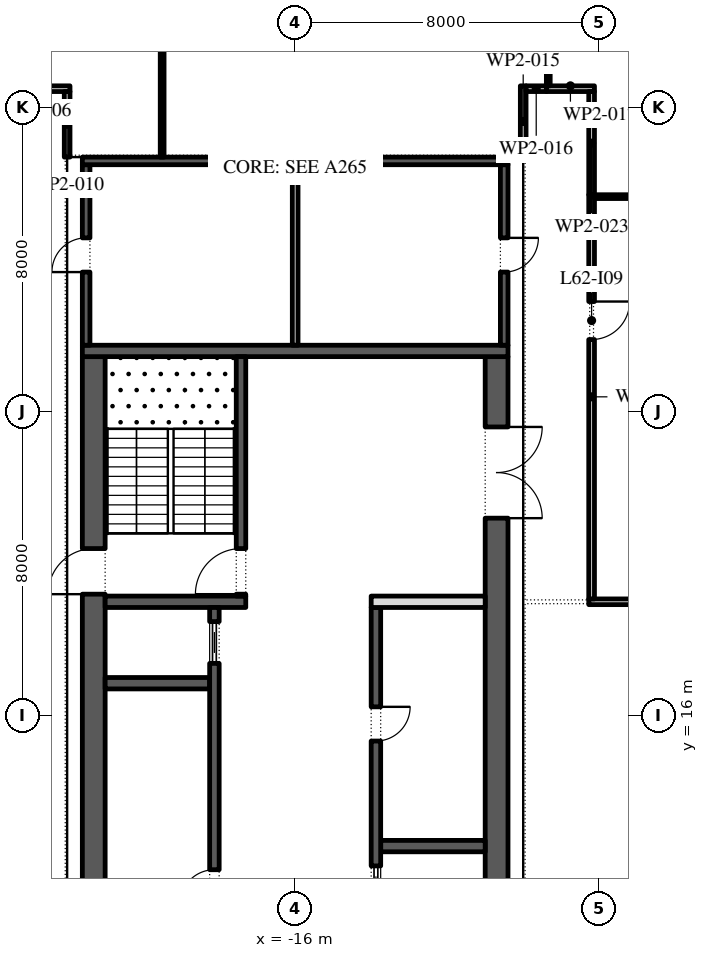
"""IFC4 building model, lengths in metres.
Left out: names, types, materials, properties, quantities, classifications, styles, units other than length and angle.
Written with IfcOpenShell. Run it as: python <this file> out.ifc"""

import sys

from ifc_helpers import new_model, si_unit, direction, frame, frame_2d, origin, place, context, subcontext, project, spatial, rectangle, extrude, element, fill, save


model = new_model("IFC4")
c1 = context("Model", 3, precision=1e-05, world=origin(), true_north=direction((0.0, 1.0)))
c2 = subcontext(c1, "Body", "Model", "MODEL_VIEW")
j1 = project(units=[si_unit("LENGTHUNIT", "METRE"), si_unit("PLANEANGLEUNIT", "RADIAN")], contexts=[c1])
p1 = place(None, origin())
s1 = spatial("IfcSite", under=j1, at=p1, CompositionType="ELEMENT")
p2 = place(p1, origin())
s2 = spatial("IfcBuilding", under=s1, at=p2, CompositionType="ELEMENT")
p3 = place(p2, frame((0.0, 0.0, 285.0)))
s3 = spatial("IfcBuildingStorey", under=s2, at=p3, CompositionType="ELEMENT", Elevation=285.0)
p4 = place(p3, frame((-21.359, 48.678, 0.0), z_axis=(0.0, 0.0, 1.0), x_axis=(-0.224949198343, -0.974370493275, 0.0)))
e1 = element("IfcWall", 1, at=p4, inside=s3, PredefinedType="STANDARD", context=c2, shape_type="SweptSolid", body=[
    extrude(rectangle(XDim=49.5, YDim=0.3, at=frame_2d((24.75, 0.0))), origin(), (0.0, 0.0, 1.0), 4.0),
])
p5 = place(p4, frame((1.157, 0.0, 0.45)))
e2 = element("IfcOpeningElement", 2, at=p5, cuts=e1, PredefinedType="OPENING", context=c2, shape_type="SweptSolid", body=[
    extrude(rectangle(XDim=4.5, YDim=3.05, at=frame_2d((2.25, 1.525))), frame((0.0, 0.16, 0.0), z_axis=(0.0, -1.0, 0.0), x_axis=(1.0, 0.0, 0.0)), (0.0, 0.0, 1.0), 0.32),
])
p6 = place(p4, frame((9.171, 0.0, 0.0)))
e3 = element("IfcOpeningElement", 3, at=p6, cuts=e1, PredefinedType="OPENING", context=c2, shape_type="SweptSolid", body=[
    extrude(rectangle(XDim=2.4, YDim=3.5, at=frame_2d((1.2, 1.75))), frame((0.0, 0.16, 0.0), z_axis=(0.0, -1.0, 0.0), x_axis=(1.0, 0.0, 0.0)), (0.0, 0.0, 1.0), 0.32),
])
p7 = place(p4, frame((15.236, 0.0, 0.45)))
e4 = element("IfcOpeningElement", 4, at=p7, cuts=e1, PredefinedType="OPENING", context=c2, shape_type="SweptSolid", body=[
    extrude(rectangle(XDim=4.5, YDim=3.05, at=frame_2d((2.25, 1.525))), frame((0.0, 0.16, 0.0), z_axis=(0.0, -1.0, 0.0), x_axis=(1.0, 0.0, 0.0)), (0.0, 0.0, 1.0), 0.32),
])
p8 = place(p4, frame((22.35, 0.0, 0.45)))
e5 = element("IfcOpeningElement", 5, at=p8, cuts=e1, PredefinedType="OPENING", context=c2, shape_type="SweptSolid", body=[
    extrude(rectangle(XDim=4.5, YDim=3.05, at=frame_2d((2.25, 1.525))), frame((0.0, 0.16, 0.0), z_axis=(0.0, -1.0, 0.0), x_axis=(1.0, 0.0, 0.0)), (0.0, 0.0, 1.0), 0.32),
])
p9 = place(p4, frame((29.464, 0.0, 0.45)))
e6 = element("IfcOpeningElement", 6, at=p9, cuts=e1, PredefinedType="OPENING", context=c2, shape_type="SweptSolid", body=[
    extrude(rectangle(XDim=4.5, YDim=3.05, at=frame_2d((2.25, 1.525))), frame((0.0, 0.16, 0.0), z_axis=(0.0, -1.0, 0.0), x_axis=(1.0, 0.0, 0.0)), (0.0, 0.0, 1.0), 0.32),
])
p10 = place(p4, frame((37.628, 0.0, 0.0)))
e7 = element("IfcOpeningElement", 7, at=p10, cuts=e1, PredefinedType="OPENING", context=c2, shape_type="SweptSolid", body=[
    extrude(rectangle(XDim=2.4, YDim=3.325, at=frame_2d((1.2, 1.663))), frame((0.0, 0.16, 0.0), z_axis=(0.0, -1.0, 0.0), x_axis=(1.0, 0.0, 0.0)), (0.0, 0.0, 1.0), 0.32),
])
p11 = place(p4, frame((43.693, 0.0, 0.45)))
e8 = element("IfcOpeningElement", 8, at=p11, cuts=e1, PredefinedType="OPENING", context=c2, shape_type="SweptSolid", body=[
    extrude(rectangle(XDim=4.5, YDim=2.825, at=frame_2d((2.25, 1.413))), frame((0.0, 0.16, 0.0), z_axis=(0.0, -1.0, 0.0), x_axis=(1.0, 0.0, 0.0)), (0.0, 0.0, 1.0), 0.32),
])
p12 = place(p3, frame((-21.3, -2.45, 0.0), z_axis=(0.0, 0.0, 1.0), x_axis=(0.0, 1.0, 0.0)))
e9 = element("IfcWall", 9, at=p12, inside=s3, PredefinedType="SHEAR", context=c2, shape_type="SweptSolid", body=[
    extrude(rectangle(XDim=27.9, YDim=0.6, at=frame_2d((13.95, 0.0))), origin(), (0.0, 0.0, 1.0), 4.0),
])
p13 = place(p12, frame((5.05, 0.0, 0.0)))
e10 = element("IfcOpeningElement", 10, at=p13, cuts=e9, PredefinedType="OPENING", context=c2, shape_type="SweptSolid", body=[
    extrude(rectangle(XDim=1.2, YDim=2.1, at=frame_2d((0.6, 1.05))), frame((0.0, 0.31, 0.0), z_axis=(0.0, -1.0, 0.0), x_axis=(1.0, 0.0, 0.0)), (0.0, 0.0, 1.0), 0.62),
])
p14 = place(p12, frame((21.65, 0.0, 0.0)))
e11 = element("IfcOpeningElement", 11, at=p14, cuts=e9, PredefinedType="OPENING", context=c2, shape_type="SweptSolid", body=[
    extrude(rectangle(XDim=1.2, YDim=2.1, at=frame_2d((0.6, 1.05))), frame((0.0, 0.31, 0.0), z_axis=(0.0, -1.0, 0.0), x_axis=(1.0, 0.0, 0.0)), (0.0, 0.0, 1.0), 0.62),
])
p15 = place(p3, frame((-10.7, -2.45, 0.0), z_axis=(0.0, 0.0, 1.0), x_axis=(0.0, 1.0, 0.0)))
e12 = element("IfcWall", 12, at=p15, inside=s3, PredefinedType="SHEAR", context=c2, shape_type="SweptSolid", body=[
    extrude(rectangle(XDim=27.9, YDim=0.6, at=frame_2d((13.95, 0.0))), origin(), (0.0, 0.0, 1.0), 4.0),
])
p16 = place(p15, frame((23.65, 0.0, 0.0)))
e13 = element("IfcOpeningElement", 13, at=p16, cuts=e12, PredefinedType="OPENING", context=c2, shape_type="SweptSolid", body=[
    extrude(rectangle(XDim=2.4, YDim=2.1, at=frame_2d((1.2, 1.05))), frame((0.0, 0.31, 0.0), z_axis=(0.0, -1.0, 0.0), x_axis=(1.0, 0.0, 0.0)), (0.0, 0.0, 1.0), 0.62),
])
p17 = place(p15, frame((1.087, 0.0, 0.0)))
e14 = element("IfcOpeningElement", 14, at=p17, cuts=e12, PredefinedType="OPENING", context=c2, shape_type="SweptSolid", body=[
    extrude(rectangle(XDim=0.9, YDim=2.1, at=frame_2d((0.45, 1.05))), frame((0.0, 0.31, 0.0), z_axis=(0.0, -1.0, 0.0), x_axis=(1.0, 0.0, 0.0)), (0.0, 0.0, 1.0), 0.62),
])
p18 = place(p15, frame((4.262, 0.0, 0.0)))
e15 = element("IfcOpeningElement", 15, at=p18, cuts=e12, PredefinedType="OPENING", context=c2, shape_type="SweptSolid", body=[
    extrude(rectangle(XDim=1.0, YDim=2.1, at=frame_2d((0.5, 1.05))), frame((0.0, 0.31, 0.0), z_axis=(0.0, -1.0, 0.0), x_axis=(1.0, 0.0, 0.0)), (0.0, 0.0, 1.0), 0.62),
])
p19 = place(p3, frame((-21.6, 25.6, 0.0), z_axis=(0.0, 0.0, 1.0), x_axis=(1.0, 0.0, 0.0)))
e16 = element("IfcWall", 16, at=p19, inside=s3, PredefinedType="SHEAR", context=c2, shape_type="SweptSolid", body=[
    extrude(rectangle(XDim=11.2, YDim=0.3, at=frame_2d((5.6, 0.0))), origin(), (0.0, 0.0, 1.0), 4.0),
])
p20 = place(p3, frame((-21.0, 19.0, 0.0), z_axis=(0.0, 0.0, 1.0), x_axis=(1.0, 0.0, 0.0)))
e17 = element("IfcWall", 17, at=p20, inside=s3, PredefinedType="SHEAR", context=c2, shape_type="SweptSolid", body=[
    extrude(rectangle(XDim=3.7, YDim=0.3, at=frame_2d((1.85, 0.0))), origin(), (0.0, 0.0, 1.0), 4.0),
])
p21 = place(p3, frame((-17.425, 19.15, 0.0), z_axis=(0.0, 0.0, 1.0), x_axis=(0.0, 1.0, 0.0)))
e18 = element("IfcWall", 18, at=p21, inside=s3, PredefinedType="SHEAR", context=c2, shape_type="SweptSolid", body=[
    extrude(rectangle(XDim=6.3, YDim=0.25, at=frame_2d((3.15, 0.0))), origin(), (0.0, 0.0, 1.0), 4.0),
])
p22 = place(p21, frame((0.05, 0.0, 0.0)))
e19 = element("IfcOpeningElement", 19, at=p22, cuts=e18, PredefinedType="OPENING", context=c2, shape_type="SweptSolid", body=[
    extrude(rectangle(XDim=1.2, YDim=2.1, at=frame_2d((0.6, 1.05))), frame((0.0, 0.135, 0.0), z_axis=(0.0, -1.0, 0.0), x_axis=(1.0, 0.0, 0.0)), (0.0, 0.0, 1.0), 0.27),
])
p23 = place(p3, frame((-21.0, 16.857, 0.0), z_axis=(0.0, 0.0, 1.0), x_axis=(1.0, 0.0, 0.0)))
e20 = element("IfcWall", 20, at=p23, inside=s3, PredefinedType="SHEAR", context=c2, shape_type="SweptSolid", body=[
    extrude(rectangle(XDim=2.75, YDim=0.3, at=frame_2d((1.375, 0.0))), origin(), (0.0, 0.0, 1.0), 4.0),
])
p24 = place(p3, frame((-18.125, 4.15, 0.0), z_axis=(0.0, 0.0, 1.0), x_axis=(0.0, 1.0, 0.0)))
e21 = element("IfcWall", 21, at=p24, inside=s3, PredefinedType="SHEAR", context=c2, shape_type="SweptSolid", body=[
    extrude(rectangle(XDim=14.7, YDim=0.25, at=frame_2d((7.35, 0.0))), origin(), (0.0, 0.0, 1.0), 4.0),
])
p25 = place(p24, frame((6.9, 0.0, 0.0)))
e22 = element("IfcOpeningElement", 22, at=p25, cuts=e21, PredefinedType="OPENING", context=c2, shape_type="SweptSolid", body=[
    extrude(rectangle(XDim=0.9, YDim=2.1, at=frame_2d((0.45, 1.05))), frame((0.0, 0.135, 0.0), z_axis=(0.0, -1.0, 0.0), x_axis=(1.0, 0.0, 0.0)), (0.0, 0.0, 1.0), 0.27),
])
p26 = place(p24, frame((0.371, 0.0, 0.0)))
e23 = element("IfcOpeningElement", 23, at=p26, cuts=e21, PredefinedType="OPENING", context=c2, shape_type="SweptSolid", body=[
    extrude(rectangle(XDim=1.1, YDim=2.1, at=frame_2d((0.55, 1.05))), frame((0.0, 0.135, 0.0), z_axis=(0.0, -1.0, 0.0), x_axis=(1.0, 0.0, 0.0)), (0.0, 0.0, 1.0), 0.27),
])
p27 = place(p24, frame((13.229, 0.0, 0.0)))
e24 = element("IfcOpeningElement", 24, at=p27, cuts=e21, PredefinedType="OPENING", context=c2, shape_type="SweptSolid", body=[
    extrude(rectangle(XDim=1.1, YDim=2.1, at=frame_2d((0.55, 1.05))), frame((0.0, 0.135, 0.0), z_axis=(0.0, -1.0, 0.0), x_axis=(1.0, 0.0, 0.0)), (0.0, 0.0, 1.0), 0.27),
])
p28 = place(p3, frame((-13.75, 12.571, 0.0), z_axis=(0.0, 0.0, 1.0), x_axis=(1.0, 0.0, 0.0)))
e25 = element("IfcWall", 25, at=p28, inside=s3, PredefinedType="SHEAR", context=c2, shape_type="SweptSolid", body=[
    extrude(rectangle(XDim=2.75, YDim=0.3, at=frame_2d((1.375, 0.0))), origin(), (0.0, 0.0, 1.0), 4.0),
])
p29 = place(p3, frame((-13.875, -2.45, 0.0), z_axis=(0.0, 0.0, 1.0), x_axis=(0.0, 1.0, 0.0)))
e26 = element("IfcWall", 26, at=p29, inside=s3, PredefinedType="SHEAR", context=c2, shape_type="SweptSolid", body=[
    extrude(rectangle(XDim=21.3, YDim=0.25, at=frame_2d((10.65, 0.0))), origin(), (0.0, 0.0, 1.0), 4.0),
])
p30 = place(p29, frame((17.786, 0.0, 0.0)))
e27 = element("IfcOpeningElement", 27, at=p30, cuts=e26, PredefinedType="OPENING", context=c2, shape_type="SweptSolid", body=[
    extrude(rectangle(XDim=0.9, YDim=2.1, at=frame_2d((0.45, 1.05))), frame((0.0, 0.135, 0.0), z_axis=(0.0, -1.0, 0.0), x_axis=(1.0, 0.0, 0.0)), (0.0, 0.0, 1.0), 0.27),
])
p31 = place(p29, frame((6.971, 0.0, 0.0)))
e28 = element("IfcOpeningElement", 28, at=p31, cuts=e26, PredefinedType="OPENING", context=c2, shape_type="SweptSolid", body=[
    extrude(rectangle(XDim=1.1, YDim=2.1, at=frame_2d((0.55, 1.05))), frame((0.0, 0.135, 0.0), z_axis=(0.0, -1.0, 0.0), x_axis=(1.0, 0.0, 0.0)), (0.0, 0.0, 1.0), 0.27),
])
p32 = place(p29, frame((9.114, 0.0, 0.0)))
e29 = element("IfcOpeningElement", 29, at=p32, cuts=e26, PredefinedType="OPENING", context=c2, shape_type="SweptSolid", body=[
    extrude(rectangle(XDim=1.1, YDim=2.1, at=frame_2d((0.55, 1.05))), frame((0.0, 0.135, 0.0), z_axis=(0.0, -1.0, 0.0), x_axis=(1.0, 0.0, 0.0)), (0.0, 0.0, 1.0), 0.27),
])
p33 = place(p29, frame((11.257, 0.0, 0.0)))
e30 = element("IfcOpeningElement", 30, at=p33, cuts=e26, PredefinedType="OPENING", context=c2, shape_type="SweptSolid", body=[
    extrude(rectangle(XDim=1.1, YDim=2.1, at=frame_2d((0.55, 1.05))), frame((0.0, 0.135, 0.0), z_axis=(0.0, -1.0, 0.0), x_axis=(1.0, 0.0, 0.0)), (0.0, 0.0, 1.0), 0.27),
])
p34 = place(p29, frame((13.4, 0.0, 0.0)))
e31 = element("IfcOpeningElement", 31, at=p34, cuts=e26, PredefinedType="OPENING", context=c2, shape_type="SweptSolid", body=[
    extrude(rectangle(XDim=1.1, YDim=2.1, at=frame_2d((0.55, 1.05))), frame((0.0, 0.135, 0.0), z_axis=(0.0, -1.0, 0.0), x_axis=(1.0, 0.0, 0.0)), (0.0, 0.0, 1.0), 0.27),
])
p35 = place(p3, frame((-14.0, 19.0, 0.0), z_axis=(0.0, 0.0, 1.0), x_axis=(1.0, 0.0, 0.0)))
e32 = element("IfcWall", 32, at=p35, inside=s3, PredefinedType="PARTITIONING", context=c2, shape_type="SweptSolid", body=[
    extrude(rectangle(XDim=3.0, YDim=0.3, at=frame_2d((1.5, 0.0))), origin(), (0.0, 0.0, 1.0), 4.0),
])
p36 = place(p3, frame((-21.5, 25.75, 0.0), z_axis=(0.0, 0.0, 1.0), x_axis=(0.0, 1.0, 0.0)))
e33 = element("IfcWall", 33, at=p36, inside=s3, PredefinedType="SHEAR", context=c2, shape_type="SweptSolid", body=[
    extrude(rectangle(XDim=4.75, YDim=0.2, at=frame_2d((2.375, 0.0))), origin(), (0.0, 0.0, 1.0), 4.0),
])
p37 = place(p36, frame((1.925, 0.0, 0.0)))
e34 = element("IfcOpeningElement", 34, at=p37, cuts=e33, PredefinedType="OPENING", context=c2, shape_type="SweptSolid", body=[
    extrude(rectangle(XDim=0.9, YDim=2.1, at=frame_2d((0.45, 1.05))), frame((0.0, 0.11, 0.0), z_axis=(0.0, -1.0, 0.0), x_axis=(1.0, 0.0, 0.0)), (0.0, 0.0, 1.0), 0.22),
])
p38 = place(p3, frame((-10.5, 25.75, 0.0), z_axis=(0.0, 0.0, 1.0), x_axis=(0.0, 1.0, 0.0)))
e35 = element("IfcWall", 35, at=p38, inside=s3, PredefinedType="SHEAR", context=c2, shape_type="SweptSolid", body=[
    extrude(rectangle(XDim=4.75, YDim=0.2, at=frame_2d((2.375, 0.0))), origin(), (0.0, 0.0, 1.0), 4.0),
])
p39 = place(p38, frame((1.925, 0.0, 0.0)))
e36 = element("IfcOpeningElement", 36, at=p39, cuts=e35, PredefinedType="OPENING", context=c2, shape_type="SweptSolid", body=[
    extrude(rectangle(XDim=0.9, YDim=2.1, at=frame_2d((0.45, 1.05))), frame((0.0, 0.11, 0.0), z_axis=(0.0, -1.0, 0.0), x_axis=(1.0, 0.0, 0.0)), (0.0, 0.0, 1.0), 0.22),
])
p40 = place(p3, frame((-21.6, 30.6, 0.0), z_axis=(0.0, 0.0, 1.0), x_axis=(1.0, 0.0, 0.0)))
e37 = element("IfcWall", 37, at=p40, inside=s3, PredefinedType="SHEAR", context=c2, shape_type="SweptSolid", body=[
    extrude(rectangle(XDim=11.2, YDim=0.2, at=frame_2d((5.6, 0.0))), origin(), (0.0, 0.0, 1.0), 4.0),
])
p41 = place(p3, frame((-16.0, 25.75, 0.0), z_axis=(0.0, 0.0, 1.0), x_axis=(0.0, 1.0, 0.0)))
e38 = element("IfcWall", 38, at=p41, inside=s3, PredefinedType="PARTITIONING", context=c2, shape_type="SweptSolid", body=[
    extrude(rectangle(XDim=4.75, YDim=0.15, at=frame_2d((2.375, 0.0))), origin(), (0.0, 0.0, 1.0), 4.0),
])
p42 = place(p3, frame((-23.8, 32.5, 0.0), z_axis=(0.0, 0.0, 1.0), x_axis=(1.0, 0.0, 0.0)))
e39 = element("IfcWall", 39, at=p42, inside=s3, PredefinedType="PARTITIONING", context=c2, shape_type="SweptSolid", body=[
    extrude(rectangle(XDim=1.875, YDim=0.15, at=frame_2d((0.938, 0.0))), origin(), (0.0, 0.0, 1.0), 4.0),
])
p43 = place(p3, frame((-22.0, 32.425, 0.0), z_axis=(0.0, 0.0, 1.0), x_axis=(0.0, -1.0, 0.0)))
e40 = element("IfcWall", 40, at=p43, inside=s3, PredefinedType="PARTITIONING", context=c2, shape_type="SweptSolid", body=[
    extrude(rectangle(XDim=1.725, YDim=0.15, at=frame_2d((0.863, 0.0))), origin(), (0.0, 0.0, 1.0), 4.0),
])
p44 = place(p3, frame((-19.5, 41.95, 0.0), z_axis=(0.0, 0.0, 1.0), x_axis=(0.0, -1.0, 0.0)))
e41 = element("IfcWall", 41, at=p44, inside=s3, PredefinedType="PARTITIONING", context=c2, shape_type="SweptSolid", body=[
    extrude(rectangle(XDim=11.25, YDim=0.1, at=frame_2d((5.625, 0.0))), origin(), (0.0, 0.0, 1.0), 4.0),
])
p45 = place(p3, frame((-10.0, 30.7, 0.0), z_axis=(0.0, 0.0, 1.0), x_axis=(0.0, 1.0, 0.0)))
e42 = element("IfcWall", 42, at=p45, inside=s3, PredefinedType="PARTITIONING", context=c2, shape_type="SweptSolid", body=[
    extrude(rectangle(XDim=1.875, YDim=0.15, at=frame_2d((0.938, 0.0))), origin(), (0.0, 0.0, 1.0), 4.0),
])
p46 = place(p3, frame((-9.925, 32.5, 0.0), z_axis=(0.0, 0.0, 1.0), x_axis=(1.0, 0.0, 0.0)))
e43 = element("IfcWall", 43, at=p46, inside=s3, PredefinedType="PARTITIONING", context=c2, shape_type="SweptSolid", body=[
    extrude(rectangle(XDim=0.535, YDim=0.15, at=frame_2d((0.268, 0.0))), origin(), (0.0, 0.0, 1.0), 4.0),
])
p47 = place(p3, frame((-9.39, 32.5, 0.0), z_axis=(0.0, 0.0, 1.0), x_axis=(1.0, 0.0, 0.0)))
e44 = element("IfcWall", 44, at=p47, inside=s3, PredefinedType="PARTITIONING", context=c2, shape_type="SweptSolid", body=[
    extrude(rectangle(XDim=1.265, YDim=0.15, at=frame_2d((0.632, 0.0))), origin(), (0.0, 0.0, 1.0), 4.0),
])
p48 = place(p3, frame((-9.34, 41.95, 0.0), z_axis=(0.0, 0.0, 1.0), x_axis=(0.0, -1.0, 0.0)))
e45 = element("IfcWall", 45, at=p48, inside=s3, PredefinedType="PARTITIONING", context=c2, shape_type="SweptSolid", body=[
    extrude(rectangle(XDim=9.375, YDim=0.1, at=frame_2d((4.688, 0.0))), origin(), (0.0, 0.0, 1.0), 4.0),
])
p49 = place(p3, frame((-8.275, 19.0, 0.0), z_axis=(0.0, 0.0, 1.0), x_axis=(1.0, 0.0, 0.0)))
e46 = element("IfcWall", 46, at=p49, inside=s3, PredefinedType="PARTITIONING", context=c2, shape_type="SweptSolid", body=[
    extrude(rectangle(XDim=7.36, YDim=0.15, at=frame_2d((3.68, 0.0))), origin(), (0.0, 0.0, 1.0), 4.0),
])
p50 = place(p3, frame((-8.2, 29.71, 0.0), z_axis=(0.0, 0.0, 1.0), x_axis=(0.0, -1.0, 0.0)))
e47 = element("IfcWall", 47, at=p50, inside=s3, PredefinedType="PARTITIONING", context=c2, shape_type="SweptSolid", body=[
    extrude(rectangle(XDim=10.635, YDim=0.15, at=frame_2d((5.317, 0.0))), origin(), (0.0, 0.0, 1.0), 4.0),
])
p51 = place(p50, frame((2.81, 0.0, 0.0)))
e48 = element("IfcOpeningElement", 48, at=p51, cuts=e47, PredefinedType="OPENING", context=c2, shape_type="SweptSolid", body=[
    extrude(rectangle(XDim=1.0, YDim=2.1, at=frame_2d((0.5, 1.05))), frame((0.0, 0.085, 0.0), z_axis=(0.0, -1.0, 0.0), x_axis=(1.0, 0.0, 0.0)), (0.0, 0.0, 1.0), 0.17),
])
p52 = place(p3, frame((-8.125, 29.66, 0.0), z_axis=(0.0, 0.0, 1.0), x_axis=(1.0, 0.0, 0.0)))
e49 = element("IfcWall", 49, at=p52, inside=s3, PredefinedType="PARTITIONING", context=c2, shape_type="SweptSolid", body=[
    extrude(rectangle(XDim=7.21, YDim=0.1, at=frame_2d((3.605, 0.0))), origin(), (0.0, 0.0, 1.0), 4.0),
])
p53 = place(p3, frame((-8.2, 32.425, 0.0), z_axis=(0.0, 0.0, 1.0), x_axis=(0.0, -1.0, 0.0)))
e50 = element("IfcWall", 50, at=p53, inside=s3, PredefinedType="PARTITIONING", context=c2, shape_type="SweptSolid", body=[
    extrude(rectangle(XDim=2.715, YDim=0.15, at=frame_2d((1.357, 0.0))), origin(), (0.0, 0.0, 1.0), 4.0),
])
p54 = place(p25, origin())
e51 = element("IfcDoor", 51, at=p54, inside=s3, OperationType="SINGLE_SWING_RIGHT", PredefinedType="DOOR", context=c2, shape_type="SweptSolid", body=[
    extrude(rectangle(XDim=0.9, YDim=2.1, at=frame_2d((0.45, 1.05))), frame((0.0, 0.125, 0.0), z_axis=(0.0, -1.0, 0.0), x_axis=(1.0, 0.0, 0.0)), (0.0, 0.0, 1.0), 0.05),
])
fill(e22, e51)
p55 = place(p27, origin())
e52 = element("IfcDoor", 52, at=p55, inside=s3, OperationType="SLIDING_TO_LEFT", PredefinedType="DOOR", context=c2, shape_type="SweptSolid", body=[
    extrude(rectangle(XDim=1.1, YDim=2.1, at=frame_2d((0.55, 1.05))), frame((0.0, 0.025, 0.0), z_axis=(0.0, -1.0, 0.0), x_axis=(1.0, 0.0, 0.0)), (0.0, 0.0, 1.0), 0.05),
])
fill(e24, e52)
p56 = place(p30, frame((0.9, -0.2, 0.0), z_axis=(0.0, 0.0, 1.0), x_axis=(-1.0, 0.0, 0.0)))
e53 = element("IfcDoor", 53, at=p56, inside=s3, OperationType="SINGLE_SWING_RIGHT", PredefinedType="DOOR", context=c2, shape_type="SweptSolid", body=[
    extrude(rectangle(XDim=0.9, YDim=2.1, at=frame_2d((0.45, 1.05))), frame((0.0, -0.075, 0.0), z_axis=(0.0, -1.0, 0.0), x_axis=(1.0, 0.0, 0.0)), (0.0, 0.0, 1.0), 0.05),
])
fill(e27, e53)
p57 = place(p34, origin())
e54 = element("IfcDoor", 54, at=p57, inside=s3, OperationType="SLIDING_TO_LEFT", PredefinedType="DOOR", context=c2, shape_type="SweptSolid", body=[
    extrude(rectangle(XDim=1.1, YDim=2.1, at=frame_2d((0.55, 1.05))), frame((0.0, 0.025, 0.0), z_axis=(0.0, -1.0, 0.0), x_axis=(1.0, 0.0, 0.0)), (0.0, 0.0, 1.0), 0.05),
])
fill(e31, e54)
p58 = place(p16, frame((2.4, 0.0, 0.0), z_axis=(0.0, 0.0, 1.0), x_axis=(-1.0, 0.0, 0.0)))
e55 = element("IfcDoor", 55, at=p58, inside=s3, OperationType="DOUBLE_DOOR_SINGLE_SWING", PredefinedType="DOOR", context=c2, shape_type="SweptSolid", body=[
    extrude(rectangle(XDim=2.4, YDim=2.1, at=frame_2d((1.2, 1.05))), frame((0.0, 0.025, 0.0), z_axis=(0.0, -1.0, 0.0), x_axis=(1.0, 0.0, 0.0)), (0.0, 0.0, 1.0), 0.05),
])
fill(e13, e55)
p59 = place(p22, origin())
e56 = element("IfcDoor", 56, at=p59, inside=s3, OperationType="SINGLE_SWING_RIGHT", PredefinedType="DOOR", context=c2, shape_type="SweptSolid", body=[
    extrude(rectangle(XDim=1.2, YDim=2.1, at=frame_2d((0.6, 1.05))), frame((0.0, 0.025, 0.0), z_axis=(0.0, -1.0, 0.0), x_axis=(1.0, 0.0, 0.0)), (0.0, 0.0, 1.0), 0.05),
])
fill(e19, e56)
p60 = place(p14, origin())
e57 = element("IfcDoor", 57, at=p60, inside=s3, OperationType="SINGLE_SWING_RIGHT", PredefinedType="DOOR", context=c2, shape_type="SweptSolid", body=[
    extrude(rectangle(XDim=1.2, YDim=2.1, at=frame_2d((0.6, 1.05))), frame((0.0, 0.025, 0.0), z_axis=(0.0, -1.0, 0.0), x_axis=(1.0, 0.0, 0.0)), (0.0, 0.0, 1.0), 0.05),
])
fill(e11, e57)
p61 = place(p37, origin())
e58 = element("IfcDoor", 58, at=p61, inside=s3, OperationType="SINGLE_SWING_RIGHT", PredefinedType="DOOR", context=c2, shape_type="SweptSolid", body=[
    extrude(rectangle(XDim=0.9, YDim=2.1, at=frame_2d((0.45, 1.05))), frame((0.0, -0.05, 0.0), z_axis=(0.0, -1.0, 0.0), x_axis=(1.0, 0.0, 0.0)), (0.0, 0.0, 1.0), 0.05),
])
fill(e34, e58)
p62 = place(p39, frame((0.9, 0.15, 0.0), z_axis=(0.0, 0.0, 1.0), x_axis=(-1.0, 0.0, 0.0)))
e59 = element("IfcDoor", 59, at=p62, inside=s3, OperationType="SINGLE_SWING_RIGHT", PredefinedType="DOOR", context=c2, shape_type="SweptSolid", body=[
    extrude(rectangle(XDim=0.9, YDim=2.1, at=frame_2d((0.45, 1.05))), frame((0.0, 0.1, 0.0), z_axis=(0.0, -1.0, 0.0), x_axis=(1.0, 0.0, 0.0)), (0.0, 0.0, 1.0), 0.05),
])
fill(e36, e59)
p63 = place(p51, origin())
e60 = element("IfcDoor", 60, at=p63, inside=s3, OperationType="SINGLE_SWING_RIGHT", PredefinedType="DOOR", context=c2, shape_type="SweptSolid", body=[
    extrude(rectangle(XDim=1.0, YDim=2.1, at=frame_2d((0.5, 1.05))), frame((0.0, 0.025, 0.0), z_axis=(0.0, -1.0, 0.0), x_axis=(1.0, 0.0, 0.0)), (0.0, 0.0, 1.0), 0.05),
])
fill(e48, e60)
save(model, sys.argv[1])
